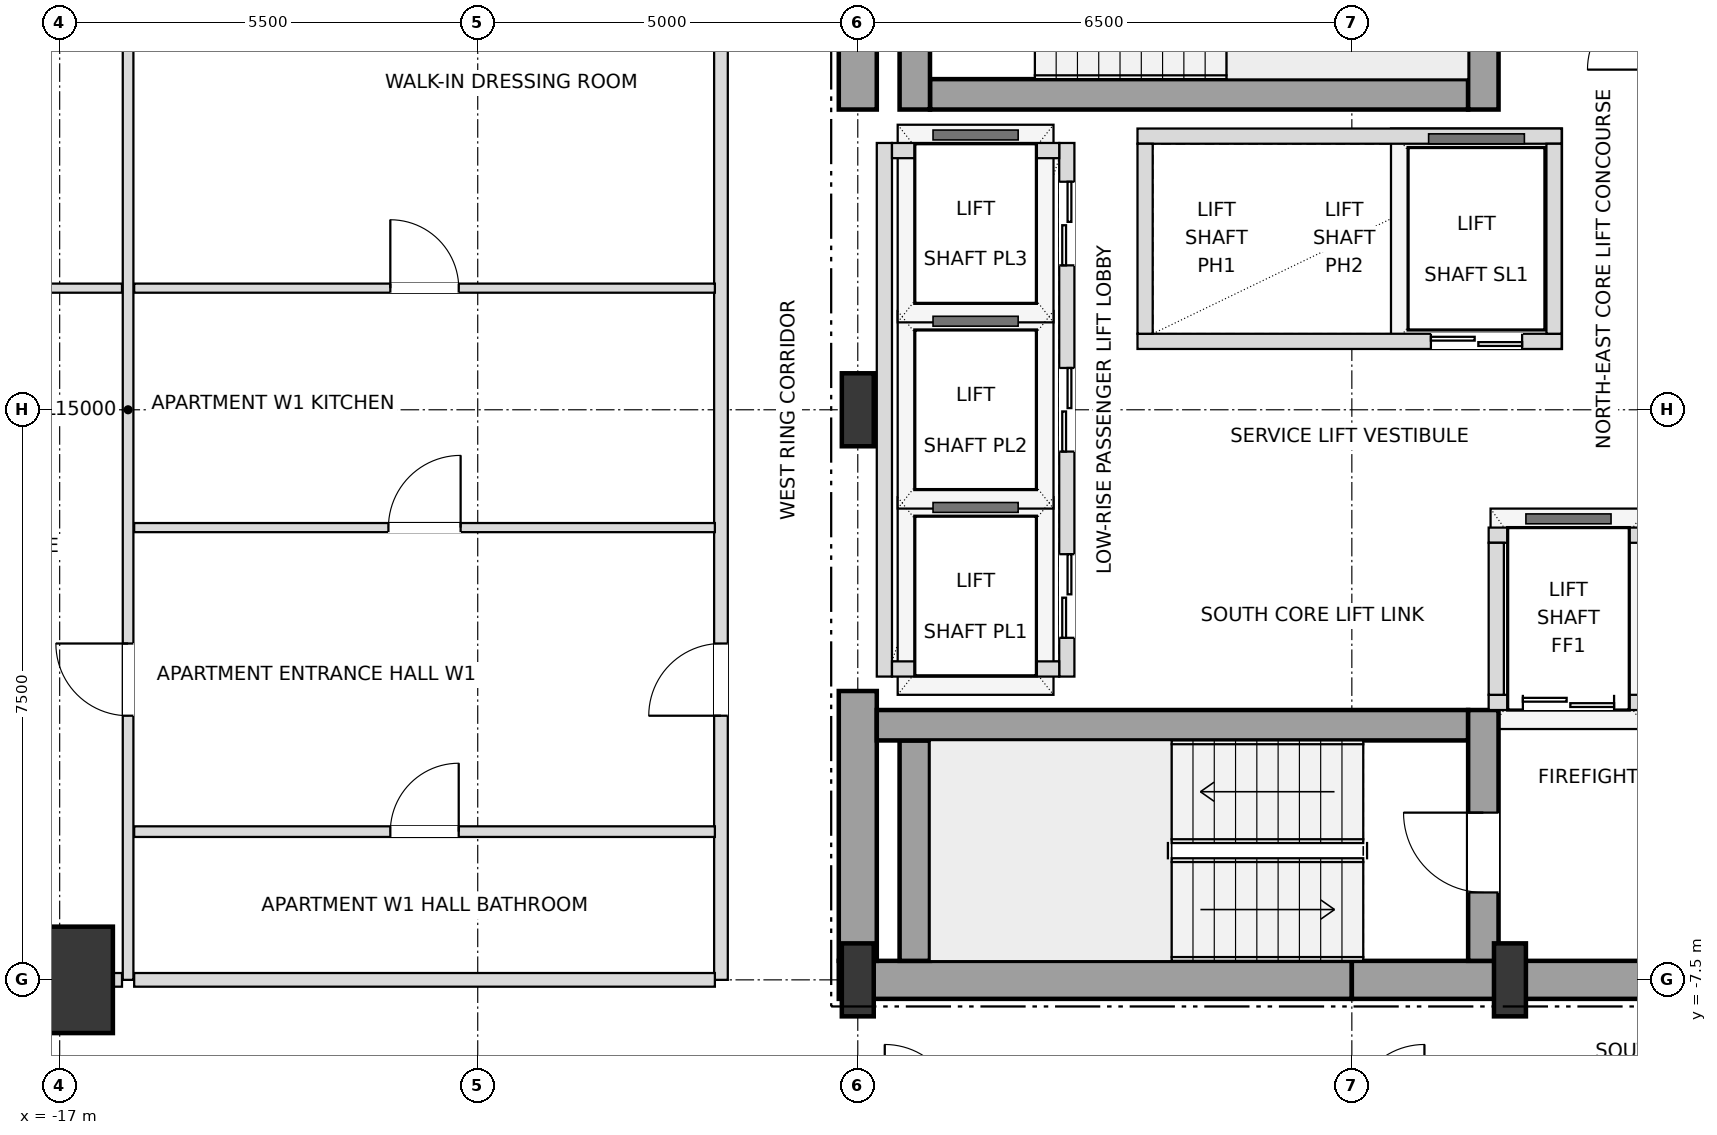
"""IFC4 building model, lengths in metres.
Left out: names, types, materials, properties, quantities, classifications, styles, units other than length and angle.
Written with IfcOpenShell. Run it as: python <this file> out.ifc"""

import sys

from ifc_helpers import new_model, si_unit, direction, frame, frame_2d, origin, origin_2d, place, context, subcontext, project, spatial, rectangle, i_section, extrude, element, fill, save


model = new_model("IFC4")
c1 = context("Model", 3, precision=1e-05, world=origin(), true_north=direction((0.0, 1.0)))
c2 = subcontext(c1, "Body", "Model", "MODEL_VIEW")
j1 = project(units=[si_unit("LENGTHUNIT", "METRE"), si_unit("PLANEANGLEUNIT", "RADIAN")], contexts=[c1])
p1 = place(None, origin())
s1 = spatial("IfcSite", under=j1, at=p1, CompositionType="ELEMENT")
p2 = place(p1, origin())
s2 = spatial("IfcBuilding", under=s1, at=p2, CompositionType="ELEMENT")
p3 = place(p2, frame((0.0, 0.0, 43.2)))
s3 = spatial("IfcBuildingStorey", under=s2, at=p3, CompositionType="ELEMENT", Elevation=43.2)
for number, where, z_axis, x_axis in (
    (1, (-6.5, -7.5, 0.0), (0.0, 0.0, 1.0), (1.0, 0.0, 0.0)),
    (2, (2.08, -7.5, 0.0), (0.0, 0.0, 1.0), (1.0, 0.0, 0.0)),
    (3, (-6.5, 0.0, 0.0), (0.0, 0.0, 1.0), (1.0, 0.0, 0.0)),
):
    element("IfcColumn", number, at=place(p3, frame(where, z_axis=z_axis, x_axis=x_axis)), inside=s3, PredefinedType="COLUMN", context=c2, shape_type="SweptSolid", body=[
        extrude(i_section(OverallWidth=0.42, OverallDepth=0.96, WebThickness=0.022, FlangeThickness=0.034, at=origin_2d()), origin(), (0.0, 0.0, 1.0), 3.6),
    ])
p4 = place(p3, frame((-17.0, -7.5, 0.0), z_axis=(0.0, 0.0, 1.0), x_axis=(1.0, 0.0, 0.0)))
e4 = element("IfcColumn", 4, at=p4, inside=s3, PredefinedType="USERDEFINED", context=c2, shape_type="SweptSolid", body=[
    extrude(rectangle(XDim=1.4, YDim=1.4, at=origin_2d()), origin(), (0.0, 0.0, 1.0), 3.6),
])
for number, where, z_axis, x_axis in (
    (5, (-6.75, -7.5, 0.0), (0.0, 0.0, 1.0), (1.0, 0.0, 0.0)),
    (6, (0.0, -7.5, 0.0), (0.0, 0.0, 1.0), (1.0, 0.0, 0.0)),
):
    element("IfcWall", number, at=place(p3, frame(where, z_axis=z_axis, x_axis=x_axis)), inside=s3, PredefinedType="SHEAR", context=c2, shape_type="SweptSolid", body=[
        extrude(rectangle(XDim=6.75, YDim=0.5, at=frame_2d((3.375, 0.0))), origin(), (0.0, 0.0, 1.0), 3.38),
    ])
p5 = place(p3, frame((-6.5, -7.25, 0.0), z_axis=(0.0, 0.0, 1.0), x_axis=(0.0, 1.0, 0.0)))
e7 = element("IfcWall", 7, at=p5, inside=s3, PredefinedType="SHEAR", context=c2, shape_type="SweptSolid", body=[
    extrude(rectangle(XDim=3.55, YDim=0.5, at=frame_2d((1.775, 0.0))), origin(), (0.0, 0.0, 1.0), 3.38),
])
p6 = place(p3, frame((-6.5, 3.95, 0.0), z_axis=(0.0, 0.0, 1.0), x_axis=(0.0, 1.0, 0.0)))
e8 = element("IfcWall", 8, at=p6, inside=s3, PredefinedType="SHEAR", context=c2, shape_type="SweptSolid", body=[
    extrude(rectangle(XDim=3.3, YDim=0.5, at=frame_2d((1.65, 0.0))), origin(), (0.0, 0.0, 1.0), 3.38),
])
p7 = place(p3, frame((-5.75, -7.25, 0.0), z_axis=(0.0, 0.0, 1.0), x_axis=(0.0, 1.0, 0.0)))
e9 = element("IfcWall", 9, at=p7, inside=s3, PredefinedType="SHEAR", context=c2, shape_type="SweptSolid", body=[
    extrude(rectangle(XDim=2.9, YDim=0.4, at=frame_2d((1.45, 0.0))), origin(), (0.0, 0.0, 1.0), 3.38),
])
p8 = place(p3, frame((-6.25, -4.15, 0.0), z_axis=(0.0, 0.0, 1.0), x_axis=(1.0, 0.0, 0.0)))
e10 = element("IfcWall", 10, at=p8, inside=s3, PredefinedType="SHEAR", context=c2, shape_type="SweptSolid", body=[
    extrude(rectangle(XDim=7.78, YDim=0.4, at=frame_2d((3.89, 0.0))), origin(), (0.0, 0.0, 1.0), 3.38),
])
p9 = place(p3, frame((1.73, -7.25, 0.0), z_axis=(0.0, 0.0, 1.0), x_axis=(0.0, 1.0, 0.0)))
e11 = element("IfcWall", 11, at=p9, inside=s3, PredefinedType="SHEAR", context=c2, shape_type="SweptSolid", body=[
    extrude(rectangle(XDim=3.3, YDim=0.4, at=frame_2d((1.65, 0.0))), origin(), (0.0, 0.0, 1.0), 3.38),
])
p10 = place(p9, frame((0.9, 0.0, 0.0)))
e12 = element("IfcOpeningElement", 12, at=p10, cuts=e11, PredefinedType="OPENING", context=c2, shape_type="SweptSolid", body=[
    extrude(rectangle(XDim=1.05, YDim=2.15, at=frame_2d((0.525, 1.075))), frame((0.0, 0.21, 0.0), z_axis=(0.0, -1.0, 0.0), x_axis=(1.0, 0.0, 0.0)), (0.0, 0.0, 1.0), 0.42),
])
p11 = place(p3, frame((-5.55, 4.15, 0.0), z_axis=(0.0, 0.0, 1.0), x_axis=(1.0, 0.0, 0.0)))
e13 = element("IfcWall", 13, at=p11, inside=s3, PredefinedType="SHEAR", context=c2, shape_type="SweptSolid", body=[
    extrude(rectangle(XDim=7.08, YDim=0.4, at=frame_2d((3.54, 0.0))), origin(), (0.0, 0.0, 1.0), 3.38),
])
for number, where, z_axis, x_axis in (
    (14, (1.73, 3.95, 0.0), (0.0, 0.0, 1.0), (0.0, 1.0, 0.0)),
    (15, (-5.75, 3.95, 0.0), (0.0, 0.0, 1.0), (0.0, 1.0, 0.0)),
):
    element("IfcWall", number, at=place(p3, frame(where, z_axis=z_axis, x_axis=x_axis)), inside=s3, PredefinedType="SHEAR", context=c2, shape_type="SweptSolid", body=[
        extrude(rectangle(XDim=3.3, YDim=0.4, at=frame_2d((1.65, 0.0))), origin(), (0.0, 0.0, 1.0), 3.38),
    ])
p12 = place(p3, frame((-3.75, -3.51, 0.0), z_axis=(0.0, 0.0, 1.0), x_axis=(0.0, 1.0, 0.0)))
e16 = element("IfcWall", 16, at=p12, inside=s3, PredefinedType="SOLIDWALL", context=c2, shape_type="SweptSolid", body=[
    extrude(rectangle(XDim=7.02, YDim=0.2, at=frame_2d((3.51, 0.0))), origin(), (0.0, 0.0, 1.0), 3.38),
])
p13 = place(p12, frame((0.51, 0.0, 0.0)))
e17 = element("IfcOpeningElement", 17, at=p13, cuts=e16, PredefinedType="OPENING", context=c2, shape_type="SweptSolid", body=[
    extrude(rectangle(XDim=1.1, YDim=2.15, at=frame_2d((0.55, 1.075))), frame((0.0, 0.11, 0.0), z_axis=(0.0, -1.0, 0.0), x_axis=(1.0, 0.0, 0.0)), (0.0, 0.0, 1.0), 0.22),
])
p14 = place(p12, frame((2.96, 0.0, 0.0)))
e18 = element("IfcOpeningElement", 18, at=p14, cuts=e16, PredefinedType="OPENING", context=c2, shape_type="SweptSolid", body=[
    extrude(rectangle(XDim=1.1, YDim=2.15, at=frame_2d((0.55, 1.075))), frame((0.0, 0.11, 0.0), z_axis=(0.0, -1.0, 0.0), x_axis=(1.0, 0.0, 0.0)), (0.0, 0.0, 1.0), 0.22),
])
p15 = place(p12, frame((5.41, 0.0, 0.0)))
e19 = element("IfcOpeningElement", 19, at=p15, cuts=e16, PredefinedType="OPENING", context=c2, shape_type="SweptSolid", body=[
    extrude(rectangle(XDim=1.1, YDim=2.15, at=frame_2d((0.55, 1.075))), frame((0.0, 0.11, 0.0), z_axis=(0.0, -1.0, 0.0), x_axis=(1.0, 0.0, 0.0)), (0.0, 0.0, 1.0), 0.22),
])
p16 = place(p3, frame((-6.15, -3.51, 0.0), z_axis=(0.0, 0.0, 1.0), x_axis=(0.0, 1.0, 0.0)))
e20 = element("IfcWall", 20, at=p16, inside=s3, PredefinedType="SOLIDWALL", context=c2, shape_type="SweptSolid", body=[
    extrude(rectangle(XDim=7.02, YDim=0.2, at=frame_2d((3.51, 0.0))), origin(), (0.0, 0.0, 1.0), 3.38),
])
for number, where, z_axis, x_axis in (
    (21, (-6.05, -3.41, 0.0), (0.0, 0.0, 1.0), (1.0, 0.0, 0.0)),
    (22, (-6.05, 3.41, 0.0), (0.0, 0.0, 1.0), (1.0, 0.0, 0.0)),
):
    element("IfcWall", number, at=place(p3, frame(where, z_axis=z_axis, x_axis=x_axis)), inside=s3, PredefinedType="SOLIDWALL", context=c2, shape_type="SweptSolid", body=[
        extrude(rectangle(XDim=2.2, YDim=0.2, at=frame_2d((1.1, 0.0))), origin(), (0.0, 0.0, 1.0), 3.38),
    ])
p17 = place(p3, frame((-2.82, 0.9, 0.0), z_axis=(0.0, 0.0, 1.0), x_axis=(1.0, 0.0, 0.0)))
e23 = element("IfcWall", 23, at=p17, inside=s3, PredefinedType="SOLIDWALL", context=c2, shape_type="SweptSolid", body=[
    extrude(rectangle(XDim=5.58, YDim=0.2, at=frame_2d((2.79, 0.0))), origin(), (0.0, 0.0, 1.0), 3.38),
])
p18 = place(p17, frame((3.86, 0.0, 0.0)))
e24 = element("IfcOpeningElement", 24, at=p18, cuts=e23, PredefinedType="OPENING", context=c2, shape_type="SweptSolid", body=[
    extrude(rectangle(XDim=1.2, YDim=2.2, at=frame_2d((0.6, 1.1))), frame((0.0, 0.11, 0.0), z_axis=(0.0, -1.0, 0.0), x_axis=(1.0, 0.0, 0.0)), (0.0, 0.0, 1.0), 0.22),
])
p19 = place(p3, frame((-2.82, 3.6, 0.0), z_axis=(0.0, 0.0, 1.0), x_axis=(1.0, 0.0, 0.0)))
e25 = element("IfcWall", 25, at=p19, inside=s3, PredefinedType="SOLIDWALL", context=c2, shape_type="SweptSolid", body=[
    extrude(rectangle(XDim=5.58, YDim=0.2, at=frame_2d((2.79, 0.0))), origin(), (0.0, 0.0, 1.0), 3.38),
])
for number, where, z_axis, x_axis in (
    (26, (-2.72, 1.0, 0.0), (0.0, 0.0, 1.0), (0.0, 1.0, 0.0)),
    (27, (2.66, 1.0, 0.0), (0.0, 0.0, 1.0), (0.0, 1.0, 0.0)),
):
    element("IfcWall", number, at=place(p3, frame(where, z_axis=z_axis, x_axis=x_axis)), inside=s3, PredefinedType="SOLIDWALL", context=c2, shape_type="SweptSolid", body=[
        extrude(rectangle(XDim=2.5, YDim=0.2, at=frame_2d((1.25, 0.0))), origin(), (0.0, 0.0, 1.0), 3.38),
    ])
p20 = place(p3, frame((1.8, -3.85, 0.0), z_axis=(0.0, 0.0, 1.0), x_axis=(1.0, 0.0, 0.0)))
e28 = element("IfcWall", 28, at=p20, inside=s3, PredefinedType="SOLIDWALL", context=c2, shape_type="SweptSolid", body=[
    extrude(rectangle(XDim=4.1, YDim=0.2, at=frame_2d((2.05, 0.0))), origin(), (0.0, 0.0, 1.0), 3.38),
])
p21 = place(p20, frame((0.45, 0.0, 0.0)))
e29 = element("IfcOpeningElement", 29, at=p21, cuts=e28, PredefinedType="OPENING", context=c2, shape_type="SweptSolid", body=[
    extrude(rectangle(XDim=1.2, YDim=2.2, at=frame_2d((0.6, 1.1))), frame((0.0, 0.11, 0.0), z_axis=(0.0, -1.0, 0.0), x_axis=(1.0, 0.0, 0.0)), (0.0, 0.0, 1.0), 0.22),
])
p22 = place(p20, frame((2.45, 0.0, 0.0)))
e30 = element("IfcOpeningElement", 30, at=p22, cuts=e28, PredefinedType="OPENING", context=c2, shape_type="SweptSolid", body=[
    extrude(rectangle(XDim=1.2, YDim=2.2, at=frame_2d((0.6, 1.1))), frame((0.0, 0.11, 0.0), z_axis=(0.0, -1.0, 0.0), x_axis=(1.0, 0.0, 0.0)), (0.0, 0.0, 1.0), 0.22),
])
p23 = place(p3, frame((1.8, -1.65, 0.0), z_axis=(0.0, 0.0, 1.0), x_axis=(1.0, 0.0, 0.0)))
e31 = element("IfcWall", 31, at=p23, inside=s3, PredefinedType="SOLIDWALL", context=c2, shape_type="SweptSolid", body=[
    extrude(rectangle(XDim=4.1, YDim=0.2, at=frame_2d((2.05, 0.0))), origin(), (0.0, 0.0, 1.0), 3.38),
])
p24 = place(p3, frame((1.9, -3.75, 0.0), z_axis=(0.0, 0.0, 1.0), x_axis=(0.0, 1.0, 0.0)))
e32 = element("IfcWall", 32, at=p24, inside=s3, PredefinedType="SOLIDWALL", context=c2, shape_type="SweptSolid", body=[
    extrude(rectangle(XDim=2.0, YDim=0.2, at=frame_2d((1.0, 0.0))), origin(), (0.0, 0.0, 1.0), 3.38),
])
p25 = place(p3, frame((-16.1, -7.5, 0.0), z_axis=(0.0, 0.0, 1.0), x_axis=(0.0, 1.0, 0.0)))
e33 = element("IfcWall", 33, at=p25, inside=s3, PredefinedType="PARTITIONING", context=c2, shape_type="SweptSolid", body=[
    extrude(rectangle(XDim=15.0, YDim=0.14, at=frame_2d((7.5, 0.0))), origin(), (0.0, 0.0, 1.0), 3.38),
])
p26 = place(p25, frame((3.475, 0.0, 0.0)))
e34 = element("IfcOpeningElement", 34, at=p26, cuts=e33, PredefinedType="OPENING", context=c2, shape_type="SweptSolid", body=[
    extrude(rectangle(XDim=0.95, YDim=2.1, at=frame_2d((0.475, 1.05))), frame((0.0, 0.08, 0.0), z_axis=(0.0, -1.0, 0.0), x_axis=(1.0, 0.0, 0.0)), (0.0, 0.0, 1.0), 0.16),
])
p27 = place(p3, frame((-8.3, -7.5, 0.0), z_axis=(0.0, 0.0, 1.0), x_axis=(0.0, 1.0, 0.0)))
e35 = element("IfcWall", 35, at=p27, inside=s3, PredefinedType="PARTITIONING", context=c2, shape_type="SweptSolid", body=[
    extrude(rectangle(XDim=15.0, YDim=0.18, at=frame_2d((7.5, 0.0))), origin(), (0.0, 0.0, 1.0), 3.38),
])
p28 = place(p27, frame((3.475, 0.0, 0.0)))
e36 = element("IfcOpeningElement", 36, at=p28, cuts=e35, PredefinedType="OPENING", context=c2, shape_type="SweptSolid", body=[
    extrude(rectangle(XDim=0.95, YDim=2.15, at=frame_2d((0.475, 1.075))), frame((0.0, 0.1, 0.0), z_axis=(0.0, -1.0, 0.0), x_axis=(1.0, 0.0, 0.0)), (0.0, 0.0, 1.0), 0.2),
])
p29 = place(p3, frame((-21.9, -7.5, 0.0), z_axis=(0.0, 0.0, 1.0), x_axis=(1.0, 0.0, 0.0)))
e37 = element("IfcWall", 37, at=p29, inside=s3, PredefinedType="PARTITIONING", context=c2, shape_type="SweptSolid", body=[
    extrude(rectangle(XDim=5.72, YDim=0.18, at=frame_2d((2.86, 0.0))), origin(), (0.0, 0.0, 1.0), 2.816),
])
p30 = place(p3, frame((-16.02, -7.5, 0.0), z_axis=(0.0, 0.0, 1.0), x_axis=(1.0, 0.0, 0.0)))
e38 = element("IfcWall", 38, at=p30, inside=s3, PredefinedType="PARTITIONING", context=c2, shape_type="SweptSolid", body=[
    extrude(rectangle(XDim=7.64, YDim=0.18, at=frame_2d((3.82, 0.0))), origin(), (0.0, 0.0, 1.0), 2.816),
])
p31 = place(p3, frame((-16.02, -5.55, 0.0), z_axis=(0.0, 0.0, 1.0), x_axis=(1.0, 0.0, 0.0)))
e39 = element("IfcWall", 39, at=p31, inside=s3, PredefinedType="PARTITIONING", context=c2, shape_type="SweptSolid", body=[
    extrude(rectangle(XDim=7.64, YDim=0.14, at=frame_2d((3.82, 0.0))), origin(), (0.0, 0.0, 1.0), 2.948),
])
p32 = place(p31, frame((3.37, 0.0, 0.0)))
e40 = element("IfcOpeningElement", 40, at=p32, cuts=e39, PredefinedType="OPENING", context=c2, shape_type="SweptSolid", body=[
    extrude(rectangle(XDim=0.9, YDim=2.1, at=frame_2d((0.45, 1.05))), frame((0.0, 0.08, 0.0), z_axis=(0.0, -1.0, 0.0), x_axis=(1.0, 0.0, 0.0)), (0.0, 0.0, 1.0), 0.16),
])
p33 = place(p3, frame((-16.02, -1.55, 0.0), z_axis=(0.0, 0.0, 1.0), x_axis=(1.0, 0.0, 0.0)))
e41 = element("IfcWall", 41, at=p33, inside=s3, PredefinedType="PARTITIONING", context=c2, shape_type="SweptSolid", body=[
    extrude(rectangle(XDim=7.64, YDim=0.12, at=frame_2d((3.82, 0.0))), origin(), (0.0, 0.0, 1.0), 2.948),
])
p34 = place(p33, frame((3.345, 0.0, 0.0)))
e42 = element("IfcOpeningElement", 42, at=p34, cuts=e41, PredefinedType="OPENING", context=c2, shape_type="SweptSolid", body=[
    extrude(rectangle(XDim=0.95, YDim=2.1, at=frame_2d((0.475, 1.05))), frame((0.0, 0.07, 0.0), z_axis=(0.0, -1.0, 0.0), x_axis=(1.0, 0.0, 0.0)), (0.0, 0.0, 1.0), 0.14),
])
p35 = place(p3, frame((-21.82, 1.6, 0.0), z_axis=(0.0, 0.0, 1.0), x_axis=(1.0, 0.0, 0.0)))
e43 = element("IfcWall", 43, at=p35, inside=s3, PredefinedType="PARTITIONING", context=c2, shape_type="SweptSolid", body=[
    extrude(rectangle(XDim=5.64, YDim=0.12, at=frame_2d((2.82, 0.0))), origin(), (0.0, 0.0, 1.0), 2.816),
])
p36 = place(p35, frame((2.37, 0.0, 0.0)))
e44 = element("IfcOpeningElement", 44, at=p36, cuts=e43, PredefinedType="OPENING", context=c2, shape_type="SweptSolid", body=[
    extrude(rectangle(XDim=0.9, YDim=2.1, at=frame_2d((0.45, 1.05))), frame((0.0, 0.07, 0.0), z_axis=(0.0, -1.0, 0.0), x_axis=(1.0, 0.0, 0.0)), (0.0, 0.0, 1.0), 0.14),
])
p37 = place(p3, frame((-16.02, 1.6, 0.0), z_axis=(0.0, 0.0, 1.0), x_axis=(1.0, 0.0, 0.0)))
e45 = element("IfcWall", 45, at=p37, inside=s3, PredefinedType="PARTITIONING", context=c2, shape_type="SweptSolid", body=[
    extrude(rectangle(XDim=7.64, YDim=0.12, at=frame_2d((3.82, 0.0))), origin(), (0.0, 0.0, 1.0), 2.948),
])
p38 = place(p37, frame((3.37, 0.0, 0.0)))
e46 = element("IfcOpeningElement", 46, at=p38, cuts=e45, PredefinedType="OPENING", context=c2, shape_type="SweptSolid", body=[
    extrude(rectangle(XDim=0.9, YDim=2.1, at=frame_2d((0.45, 1.05))), frame((0.0, 0.07, 0.0), z_axis=(0.0, -1.0, 0.0), x_axis=(1.0, 0.0, 0.0)), (0.0, 0.0, 1.0), 0.14),
])
p39 = place(p10, origin())
e47 = element("IfcDoor", 47, at=p39, inside=s3, OperationType="SINGLE_SWING_RIGHT", PredefinedType="DOOR", context=c2, shape_type="SweptSolid", body=[
    extrude(rectangle(XDim=1.05, YDim=2.15, at=frame_2d((0.525, 1.075))), frame((0.0, 0.025, 0.0), z_axis=(0.0, -1.0, 0.0), x_axis=(1.0, 0.0, 0.0)), (0.0, 0.0, 1.0), 0.05),
])
fill(e12, e47)
p40 = place(p13, origin())
e48 = element("IfcDoor", 48, at=p40, inside=s3, OperationType="DOUBLE_DOOR_SLIDING", PredefinedType="DOOR", context=c2, shape_type="SweptSolid", body=[
    extrude(rectangle(XDim=1.1, YDim=2.15, at=frame_2d((0.55, 1.075))), frame((0.0, 0.025, 0.0), z_axis=(0.0, -1.0, 0.0), x_axis=(1.0, 0.0, 0.0)), (0.0, 0.0, 1.0), 0.05),
])
fill(e17, e48)
p41 = place(p14, origin())
e49 = element("IfcDoor", 49, at=p41, inside=s3, OperationType="DOUBLE_DOOR_SLIDING", PredefinedType="DOOR", context=c2, shape_type="SweptSolid", body=[
    extrude(rectangle(XDim=1.1, YDim=2.15, at=frame_2d((0.55, 1.075))), frame((0.0, 0.025, 0.0), z_axis=(0.0, -1.0, 0.0), x_axis=(1.0, 0.0, 0.0)), (0.0, 0.0, 1.0), 0.05),
])
fill(e18, e49)
p42 = place(p15, origin())
e50 = element("IfcDoor", 50, at=p42, inside=s3, OperationType="DOUBLE_DOOR_SLIDING", PredefinedType="DOOR", context=c2, shape_type="SweptSolid", body=[
    extrude(rectangle(XDim=1.1, YDim=2.15, at=frame_2d((0.55, 1.075))), frame((0.0, 0.025, 0.0), z_axis=(0.0, -1.0, 0.0), x_axis=(1.0, 0.0, 0.0)), (0.0, 0.0, 1.0), 0.05),
])
fill(e19, e50)
p43 = place(p18, origin())
e51 = element("IfcDoor", 51, at=p43, inside=s3, OperationType="DOUBLE_DOOR_SLIDING", PredefinedType="DOOR", context=c2, shape_type="SweptSolid", body=[
    extrude(rectangle(XDim=1.2, YDim=2.2, at=frame_2d((0.6, 1.1))), frame((0.0, 0.025, 0.0), z_axis=(0.0, -1.0, 0.0), x_axis=(1.0, 0.0, 0.0)), (0.0, 0.0, 1.0), 0.05),
])
fill(e24, e51)
p44 = place(p21, origin())
e52 = element("IfcDoor", 52, at=p44, inside=s3, OperationType="DOUBLE_DOOR_SLIDING", PredefinedType="DOOR", context=c2, shape_type="SweptSolid", body=[
    extrude(rectangle(XDim=1.2, YDim=2.2, at=frame_2d((0.6, 1.1))), frame((0.0, 0.025, 0.0), z_axis=(0.0, -1.0, 0.0), x_axis=(1.0, 0.0, 0.0)), (0.0, 0.0, 1.0), 0.05),
])
fill(e29, e52)
p45 = place(p32, origin())
e53 = element("IfcDoor", 53, at=p45, inside=s3, OperationType="SINGLE_SWING_RIGHT", PredefinedType="DOOR", context=c2, shape_type="SweptSolid", body=[
    extrude(rectangle(XDim=0.9, YDim=2.1, at=frame_2d((0.45, 1.05))), frame((0.0, 0.025, 0.0), z_axis=(0.0, -1.0, 0.0), x_axis=(1.0, 0.0, 0.0)), (0.0, 0.0, 1.0), 0.05),
])
fill(e40, e53)
p46 = place(p28, origin())
e54 = element("IfcDoor", 54, at=p46, inside=s3, OperationType="SINGLE_SWING_LEFT", PredefinedType="DOOR", context=c2, shape_type="SweptSolid", body=[
    extrude(rectangle(XDim=0.95, YDim=2.15, at=frame_2d((0.475, 1.075))), frame((0.0, 0.025, 0.0), z_axis=(0.0, -1.0, 0.0), x_axis=(1.0, 0.0, 0.0)), (0.0, 0.0, 1.0), 0.05),
])
fill(e36, e54)
p47 = place(p34, origin())
e55 = element("IfcDoor", 55, at=p47, inside=s3, OperationType="SINGLE_SWING_RIGHT", PredefinedType="DOOR", context=c2, shape_type="SweptSolid", body=[
    extrude(rectangle(XDim=0.95, YDim=2.1, at=frame_2d((0.475, 1.05))), frame((0.0, 0.025, 0.0), z_axis=(0.0, -1.0, 0.0), x_axis=(1.0, 0.0, 0.0)), (0.0, 0.0, 1.0), 0.05),
])
fill(e42, e55)
p48 = place(p38, origin())
e56 = element("IfcDoor", 56, at=p48, inside=s3, OperationType="SINGLE_SWING_LEFT", PredefinedType="DOOR", context=c2, shape_type="SweptSolid", body=[
    extrude(rectangle(XDim=0.9, YDim=2.1, at=frame_2d((0.45, 1.05))), frame((0.0, 0.025, 0.0), z_axis=(0.0, -1.0, 0.0), x_axis=(1.0, 0.0, 0.0)), (0.0, 0.0, 1.0), 0.05),
])
fill(e46, e56)
p49 = place(p26, origin())
e57 = element("IfcDoor", 57, at=p49, inside=s3, OperationType="SINGLE_SWING_RIGHT", PredefinedType="DOOR", context=c2, shape_type="SweptSolid", body=[
    extrude(rectangle(XDim=0.95, YDim=2.1, at=frame_2d((0.475, 1.05))), frame((0.0, 0.025, 0.0), z_axis=(0.0, -1.0, 0.0), x_axis=(1.0, 0.0, 0.0)), (0.0, 0.0, 1.0), 0.05),
])
fill(e34, e57)
save(model, sys.argv[1])
